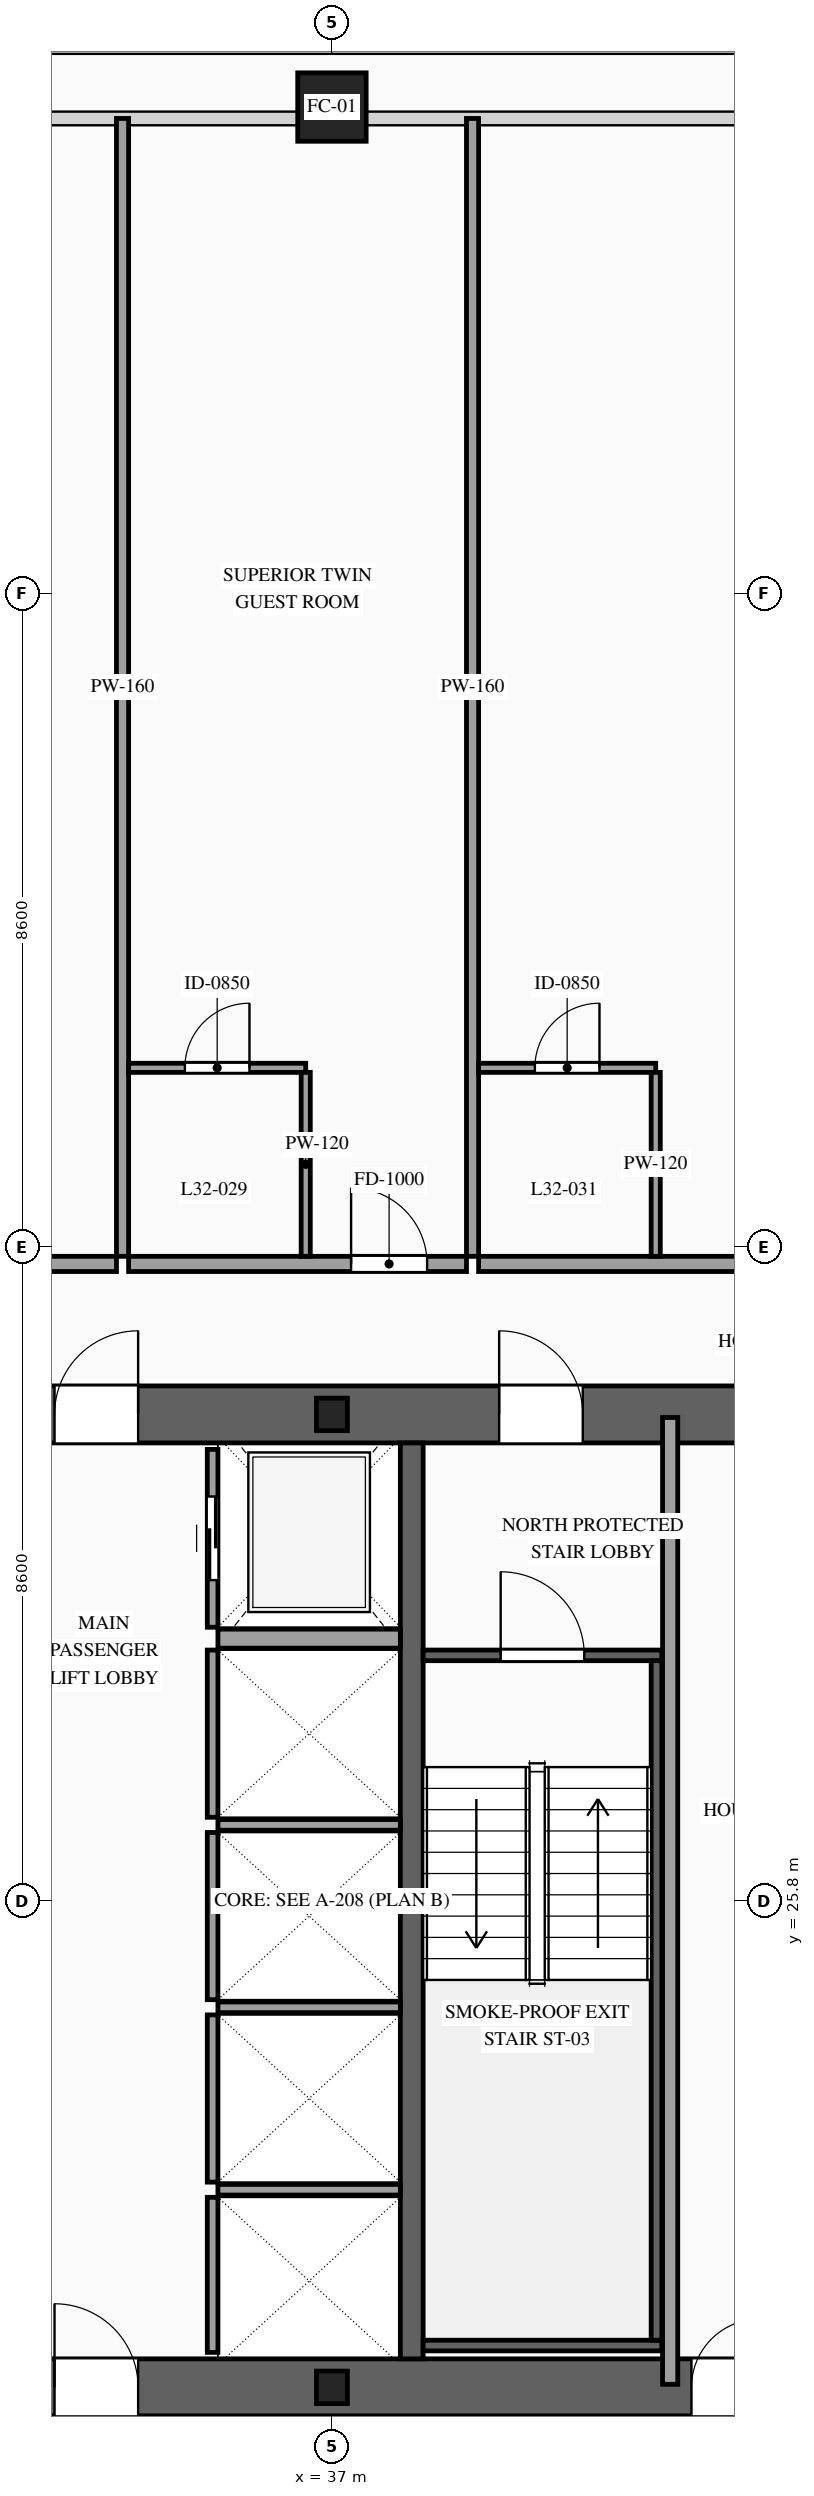
"""IFC4 building model, lengths in metres.
Left out: names, types, materials, properties, quantities, classifications, styles, units other than length and angle.
Written with IfcOpenShell. Run it as: python <this file> out.ifc"""

import sys

from ifc_helpers import new_model, si_unit, direction, frame, frame_2d, origin, origin_2d, place, context, subcontext, project, spatial, rectangle, hollow_rectangle, i_section, extrude, source, transform, mapped, element, fill, save


model = new_model("IFC4")
c1 = context("Model", 3, precision=1e-05, world=origin(), true_north=direction((0.0, 1.0)))
c2 = subcontext(c1, "Body", "Model", "MODEL_VIEW")
j1 = project(units=[si_unit("LENGTHUNIT", "METRE"), si_unit("PLANEANGLEUNIT", "RADIAN")], contexts=[c1])
p1 = place(None, origin())
s1 = spatial("IfcSite", under=j1, at=p1, CompositionType="ELEMENT")
p2 = place(p1, origin())
s2 = spatial("IfcBuilding", under=s1, at=p2, CompositionType="ELEMENT")
p3 = place(p2, frame((0.0, 0.0, 122.6)))
s3 = spatial("IfcBuildingStorey", under=s2, at=p3, CompositionType="ELEMENT", Elevation=122.6)
p4 = place(p3, frame((23.425, 19.4, 0.0), z_axis=(0.0, 0.0, 1.0), x_axis=(1.0, 0.0, 0.0)))
e1 = element("IfcWall", 1, at=p4, inside=s3, PredefinedType="SHEAR", context=c2, shape_type="SweptSolid", body=[
    extrude(rectangle(XDim=27.15, YDim=0.75, at=frame_2d((13.575, 0.0))), origin(), (0.0, 0.0, 1.0), 3.6),
])
p5 = place(p4, frame((2.025, 0.0, 0.0)))
e2 = element("IfcOpeningElement", 2, at=p5, cuts=e1, PredefinedType="OPENING", context=c2, shape_type="SweptSolid", body=[
    extrude(rectangle(XDim=1.1, YDim=2.2, at=frame_2d((0.55, 1.1))), frame((0.0, 0.39, 0.0), z_axis=(0.0, -1.0, 0.0), x_axis=(1.0, 0.0, 0.0)), (0.0, 0.0, 1.0), 0.78),
])
p6 = place(p4, frame((9.925, 0.0, 0.0)))
e3 = element("IfcOpeningElement", 3, at=p6, cuts=e1, PredefinedType="OPENING", context=c2, shape_type="SweptSolid", body=[
    extrude(rectangle(XDim=1.1, YDim=2.2, at=frame_2d((0.55, 1.1))), frame((0.0, 0.39, 0.0), z_axis=(0.0, -1.0, 0.0), x_axis=(1.0, 0.0, 0.0)), (0.0, 0.0, 1.0), 0.78),
])
p7 = place(p4, frame((23.125, 0.0, 0.0)))
e4 = element("IfcOpeningElement", 4, at=p7, cuts=e1, PredefinedType="OPENING", context=c2, shape_type="SweptSolid", body=[
    extrude(rectangle(XDim=1.1, YDim=2.2, at=frame_2d((0.55, 1.1))), frame((0.0, 0.39, 0.0), z_axis=(0.0, -1.0, 0.0), x_axis=(1.0, 0.0, 0.0)), (0.0, 0.0, 1.0), 0.78),
])
p8 = place(p4, frame((19.745, 0.0, 0.0)))
e5 = element("IfcOpeningElement", 5, at=p8, cuts=e1, PredefinedType="OPENING", context=c2, shape_type="SweptSolid", body=[
    extrude(rectangle(XDim=0.9, YDim=2.15, at=frame_2d((0.45, 1.075))), frame((0.0, 0.39, 0.0), z_axis=(0.0, -1.0, 0.0), x_axis=(1.0, 0.0, 0.0)), (0.0, 0.0, 1.0), 0.78),
])
p9 = place(p4, frame((18.305, 0.0, 0.0)))
e6 = element("IfcOpeningElement", 6, at=p9, cuts=e1, PredefinedType="OPENING", context=c2, shape_type="SweptSolid", body=[
    extrude(rectangle(XDim=0.9, YDim=2.15, at=frame_2d((0.45, 1.075))), frame((0.0, 0.39, 0.0), z_axis=(0.0, -1.0, 0.0), x_axis=(1.0, 0.0, 0.0)), (0.0, 0.0, 1.0), 0.78),
])
p10 = place(p3, frame((23.425, 32.2, 0.0), z_axis=(0.0, 0.0, 1.0), x_axis=(1.0, 0.0, 0.0)))
e7 = element("IfcWall", 7, at=p10, inside=s3, PredefinedType="SHEAR", context=c2, shape_type="SweptSolid", body=[
    extrude(rectangle(XDim=27.15, YDim=0.75, at=frame_2d((13.575, 0.0))), origin(), (0.0, 0.0, 1.0), 3.6),
])
p11 = place(p10, frame((4.645, 0.0, 0.0)))
e8 = element("IfcOpeningElement", 8, at=p11, cuts=e7, PredefinedType="OPENING", context=c2, shape_type="SweptSolid", body=[
    extrude(rectangle(XDim=0.9, YDim=2.15, at=frame_2d((0.45, 1.075))), frame((0.0, 0.39, 0.0), z_axis=(0.0, -1.0, 0.0), x_axis=(1.0, 0.0, 0.0)), (0.0, 0.0, 1.0), 0.78),
])
p12 = place(p10, frame((9.925, 0.0, 0.0)))
e9 = element("IfcOpeningElement", 9, at=p12, cuts=e7, PredefinedType="OPENING", context=c2, shape_type="SweptSolid", body=[
    extrude(rectangle(XDim=1.1, YDim=2.2, at=frame_2d((0.55, 1.1))), frame((0.0, 0.39, 0.0), z_axis=(0.0, -1.0, 0.0), x_axis=(1.0, 0.0, 0.0)), (0.0, 0.0, 1.0), 0.78),
])
p13 = place(p10, frame((15.775, 0.0, 0.0)))
e10 = element("IfcOpeningElement", 10, at=p13, cuts=e7, PredefinedType="OPENING", context=c2, shape_type="SweptSolid", body=[
    extrude(rectangle(XDim=1.1, YDim=2.2, at=frame_2d((0.55, 1.1))), frame((0.0, 0.39, 0.0), z_axis=(0.0, -1.0, 0.0), x_axis=(1.0, 0.0, 0.0)), (0.0, 0.0, 1.0), 0.78),
])
m1 = source(origin(), c2, "Body", "SweptSolid", [
    extrude(rectangle(XDim=12.05, YDim=0.3, at=frame_2d((6.025, 0.0))), origin(), (0.0, 0.0, 1.0), 3.6),
])
p14 = place(p3, frame((38.05, 19.775, 0.0), z_axis=(0.0, 0.0, 1.0), x_axis=(0.0, 1.0, 0.0)))
e11 = element("IfcWall", 11, at=p14, inside=s3, PredefinedType="SOLIDWALL", context=c2, shape_type="MappedRepresentation", body=[
    mapped(m1, transform((0.0, 0.0, 0.0), scale=1.0)),
])
m2 = source(origin(), c2, "Body", "SweptSolid", [
    extrude(i_section(OverallWidth=0.407, OverallDepth=0.428, WebThickness=0.02, FlangeThickness=0.035, at=origin_2d()), origin(), (0.0, 0.0, 1.0), 3.6),
])
for number, where, z_axis, x_axis in (
    (12, (37.0, 19.4, 0.0), (0.0, 0.0, 1.0), (1.0, 0.0, 0.0)),
    (13, (37.0, 32.2, 0.0), (0.0, 0.0, 1.0), (1.0, 0.0, 0.0)),
):
    element("IfcColumn", number, at=place(p3, frame(where, z_axis=z_axis, x_axis=x_axis)), inside=s3, PredefinedType="COLUMN", context=c2, shape_type="MappedRepresentation", body=[
        mapped(m2, transform((0.0, 0.0, 0.0), scale=1.0)),
    ])
m3 = source(origin(), c2, "Body", "SweptSolid", [
    extrude(hollow_rectangle(XDim=0.9, YDim=0.9, WallThickness=0.042, at=origin_2d()), origin(), (0.0, 0.0, 1.0), 3.6),
])
p15 = place(p3, frame((37.0, 49.4, 0.0), z_axis=(0.0, 0.0, 1.0), x_axis=(1.0, 0.0, 0.0)))
e14 = element("IfcColumn", 14, at=p15, inside=s3, PredefinedType="COLUMN", context=c2, shape_type="MappedRepresentation", body=[
    mapped(m3, transform((0.0, 0.0, 0.0), scale=1.0)),
])
m4 = source(origin(), c2, "Body", "SweptSolid", [
    extrude(rectangle(XDim=2.04, YDim=0.14, at=frame_2d((1.02, 0.0))), origin(), (0.0, 0.0, 1.0), 3.38),
])
p16 = place(p3, frame((35.43, 19.86, 0.0), z_axis=(0.0, 0.0, 1.0), x_axis=(0.0, 1.0, 0.0)))
e15 = element("IfcWall", 15, at=p16, inside=s3, PredefinedType="SOLIDWALL", context=c2, shape_type="MappedRepresentation", body=[
    mapped(m4, transform((0.0, 0.0, 0.0), scale=1.0)),
])
m5 = source(origin(), c2, "Body", "SweptSolid", [
    extrude(rectangle(XDim=2.4, YDim=0.14, at=frame_2d((1.2, 0.0))), origin(), (0.0, 0.0, 1.0), 3.38),
])
p17 = place(p3, frame((35.5, 22.0, 0.0), z_axis=(0.0, 0.0, 1.0), x_axis=(1.0, 0.0, 0.0)))
e16 = element("IfcWall", 16, at=p17, inside=s3, PredefinedType="SOLIDWALL", context=c2, shape_type="MappedRepresentation", body=[
    mapped(m5, transform((0.0, 0.0, 0.0), scale=1.0)),
])
m6 = source(origin(), c2, "Body", "SweptSolid", [
    extrude(rectangle(XDim=2.2, YDim=0.14, at=frame_2d((1.1, 0.0))), origin(), (0.0, 0.0, 1.0), 3.38),
])
p18 = place(p3, frame((35.43, 22.1, 0.0), z_axis=(0.0, 0.0, 1.0), x_axis=(0.0, 1.0, 0.0)))
e17 = element("IfcWall", 17, at=p18, inside=s3, PredefinedType="SOLIDWALL", context=c2, shape_type="MappedRepresentation", body=[
    mapped(m6, transform((0.0, 0.0, 0.0), scale=1.0)),
])
p19 = place(p3, frame((35.5, 24.4, 0.0), z_axis=(0.0, 0.0, 1.0), x_axis=(1.0, 0.0, 0.0)))
e18 = element("IfcWall", 18, at=p19, inside=s3, PredefinedType="SOLIDWALL", context=c2, shape_type="MappedRepresentation", body=[
    mapped(m5, transform((0.0, 0.0, 0.0), scale=1.0)),
])
p20 = place(p3, frame((35.43, 24.5, 0.0), z_axis=(0.0, 0.0, 1.0), x_axis=(0.0, 1.0, 0.0)))
e19 = element("IfcWall", 19, at=p20, inside=s3, PredefinedType="SOLIDWALL", context=c2, shape_type="MappedRepresentation", body=[
    mapped(m6, transform((0.0, 0.0, 0.0), scale=1.0)),
])
p21 = place(p3, frame((35.5, 26.8, 0.0), z_axis=(0.0, 0.0, 1.0), x_axis=(1.0, 0.0, 0.0)))
e20 = element("IfcWall", 20, at=p21, inside=s3, PredefinedType="SOLIDWALL", context=c2, shape_type="MappedRepresentation", body=[
    mapped(m5, transform((0.0, 0.0, 0.0), scale=1.0)),
])
m7 = source(origin(), c2, "Body", "SweptSolid", [
    extrude(rectangle(XDim=2.2, YDim=0.14, at=frame_2d((1.1, 0.0))), origin(), (0.0, 0.0, 1.0), 3.38),
])
p22 = place(p3, frame((35.43, 26.9, 0.0), z_axis=(0.0, 0.0, 1.0), x_axis=(0.0, 1.0, 0.0)))
e21 = element("IfcWall", 21, at=p22, inside=s3, PredefinedType="SOLIDWALL", context=c2, shape_type="MappedRepresentation", body=[
    mapped(m7, transform((0.0, 0.0, 0.0), scale=1.0)),
])
p23 = place(p3, frame((35.43, 29.4, 0.0), z_axis=(0.0, 0.0, 1.0), x_axis=(0.0, 1.0, 0.0)))
e22 = element("IfcWall", 22, at=p23, inside=s3, PredefinedType="SOLIDWALL", context=c2, shape_type="SweptSolid", body=[
    extrude(rectangle(XDim=2.34, YDim=0.14, at=frame_2d((1.17, 0.0))), origin(), (0.0, 0.0, 1.0), 3.38),
])
p24 = place(p23, frame((0.62, 0.0, 0.0)))
e23 = element("IfcOpeningElement", 23, at=p24, cuts=e22, PredefinedType="OPENING", context=c2, shape_type="SweptSolid", body=[
    extrude(rectangle(XDim=1.1, YDim=2.2, at=frame_2d((0.55, 1.1))), frame((0.0, 0.085, 0.0), z_axis=(0.0, -1.0, 0.0), x_axis=(1.0, 0.0, 0.0)), (0.0, 0.0, 1.0), 0.17),
])
m8 = source(origin(), c2, "Body", "SweptSolid", [
    extrude(rectangle(XDim=2.4, YDim=0.25, at=frame_2d((1.2, 0.0))), origin(), (0.0, 0.0, 1.0), 3.38),
])
p25 = place(p3, frame((35.5, 29.25, 0.0), z_axis=(0.0, 0.0, 1.0), x_axis=(1.0, 0.0, 0.0)))
e24 = element("IfcWall", 24, at=p25, inside=s3, PredefinedType="SOLIDWALL", context=c2, shape_type="MappedRepresentation", body=[
    mapped(m8, transform((0.0, 0.0, 0.0), scale=1.0)),
])
p26 = place(p3, frame((38.2, 29.03, 0.0), z_axis=(0.0, 0.0, 1.0), x_axis=(1.0, 0.0, 0.0)))
e25 = element("IfcWall", 25, at=p26, inside=s3, PredefinedType="SOLIDWALL", context=c2, shape_type="SweptSolid", body=[
    extrude(rectangle(XDim=3.14, YDim=0.14, at=frame_2d((1.57, 0.0))), origin(), (0.0, 0.0, 1.0), 3.38),
])
p27 = place(p26, frame((1.02, 0.0, 0.0)))
e26 = element("IfcOpeningElement", 26, at=p27, cuts=e25, PredefinedType="OPENING", context=c2, shape_type="SweptSolid", body=[
    extrude(rectangle(XDim=1.1, YDim=2.2, at=frame_2d((0.55, 1.1))), frame((0.0, 0.085, 0.0), z_axis=(0.0, -1.0, 0.0), x_axis=(1.0, 0.0, 0.0)), (0.0, 0.0, 1.0), 0.17),
])
m9 = source(origin(), c2, "Body", "SweptSolid", [
    extrude(rectangle(XDim=3.14, YDim=0.14, at=frame_2d((1.57, 0.0))), origin(), (0.0, 0.0, 1.0), 3.38),
])
p28 = place(p3, frame((38.2, 19.95, 0.0), z_axis=(0.0, 0.0, 1.0), x_axis=(1.0, 0.0, 0.0)))
e27 = element("IfcWall", 27, at=p28, inside=s3, PredefinedType="SOLIDWALL", context=c2, shape_type="MappedRepresentation", body=[
    mapped(m9, transform((0.0, 0.0, 0.0), scale=1.0)),
])
m10 = source(origin(), c2, "Body", "SweptSolid", [
    extrude(rectangle(XDim=8.94, YDim=0.14, at=frame_2d((4.47, 0.0))), origin(), (0.0, 0.0, 1.0), 3.38),
])
p29 = place(p3, frame((41.27, 20.02, 0.0), z_axis=(0.0, 0.0, 1.0), x_axis=(0.0, 1.0, 0.0)))
e28 = element("IfcWall", 28, at=p29, inside=s3, PredefinedType="SOLIDWALL", context=c2, shape_type="MappedRepresentation", body=[
    mapped(m10, transform((0.0, 0.0, 0.0), scale=1.0)),
])
m11 = source(origin(), c2, "Body", "SweptSolid", [
    extrude(rectangle(XDim=12.72, YDim=0.2, at=frame_2d((6.36, 0.0))), origin(), (0.0, 0.0, 1.0), 3.38),
])
p30 = place(p3, frame((41.45, 19.44, 0.0), z_axis=(0.0, 0.0, 1.0), x_axis=(0.0, 1.0, 0.0)))
e29 = element("IfcWall", 29, at=p30, inside=s3, PredefinedType="PARTITIONING", context=c2, shape_type="MappedRepresentation", body=[
    mapped(m11, transform((0.0, 0.0, 0.0), scale=1.0)),
])
p31 = place(p3, frame((22.482, 34.18, 0.0), z_axis=(0.0, 0.0, 1.0), x_axis=(1.0, 0.0, 0.0)))
e30 = element("IfcWall", 30, at=p31, inside=s3, PredefinedType="PARTITIONING", context=c2, shape_type="SweptSolid", body=[
    extrude(rectangle(XDim=11.683, YDim=0.2, at=frame_2d((5.842, 0.0))), origin(), (0.0, 0.0, 1.0), 3.38),
])
p32 = place(p31, frame((6.547, 0.0, 0.0)))
e31 = element("IfcOpeningElement", 31, at=p32, cuts=e30, PredefinedType="OPENING", context=c2, shape_type="SweptSolid", body=[
    extrude(rectangle(XDim=1.0, YDim=2.2, at=frame_2d((0.5, 1.1))), frame((0.0, 0.115, 0.0), z_axis=(0.0, -1.0, 0.0), x_axis=(1.0, 0.0, 0.0)), (0.0, 0.0, 1.0), 0.23),
])
m12 = source(origin(), c2, "Body", "SweptSolid", [
    extrude(rectangle(XDim=14.97, YDim=0.16, at=frame_2d((7.485, 0.0))), origin(), (0.0, 0.0, 1.0), 3.38),
])
p33 = place(p3, frame((34.245, 34.28, 0.0), z_axis=(0.0, 0.0, 1.0), x_axis=(0.0, 1.0, 0.0)))
e32 = element("IfcWall", 32, at=p33, inside=s3, PredefinedType="PARTITIONING", context=c2, shape_type="MappedRepresentation", body=[
    mapped(m12, transform((0.0, 0.0, 0.0), scale=1.0)),
])
p34 = place(p3, frame((34.325, 34.18, 0.0), z_axis=(0.0, 0.0, 1.0), x_axis=(1.0, 0.0, 0.0)))
e33 = element("IfcWall", 33, at=p34, inside=s3, PredefinedType="PARTITIONING", context=c2, shape_type="SweptSolid", body=[
    extrude(rectangle(XDim=4.445, YDim=0.2, at=frame_2d((2.223, 0.0))), origin(), (0.0, 0.0, 1.0), 3.38),
])
p35 = place(p34, frame((2.927, 0.0, 0.0)))
e34 = element("IfcOpeningElement", 34, at=p35, cuts=e33, PredefinedType="OPENING", context=c2, shape_type="SweptSolid", body=[
    extrude(rectangle(XDim=1.0, YDim=2.2, at=frame_2d((0.5, 1.1))), frame((0.0, 0.115, 0.0), z_axis=(0.0, -1.0, 0.0), x_axis=(1.0, 0.0, 0.0)), (0.0, 0.0, 1.0), 0.23),
])
p36 = place(p3, frame((38.85, 34.28, 0.0), z_axis=(0.0, 0.0, 1.0), x_axis=(0.0, 1.0, 0.0)))
e35 = element("IfcWall", 35, at=p36, inside=s3, PredefinedType="PARTITIONING", context=c2, shape_type="MappedRepresentation", body=[
    mapped(m12, transform((0.0, 0.0, 0.0), scale=1.0)),
])
p37 = place(p3, frame((34.325, 36.76, 0.0), z_axis=(0.0, 0.0, 1.0), x_axis=(1.0, 0.0, 0.0)))
e36 = element("IfcWall", 36, at=p37, inside=s3, PredefinedType="PARTITIONING", context=c2, shape_type="SweptSolid", body=[
    extrude(rectangle(XDim=2.33, YDim=0.12, at=frame_2d((1.165, 0.0))), origin(), (0.0, 0.0, 1.0), 3.38),
])
p38 = place(p37, frame((0.74, 0.0, 0.0)))
e37 = element("IfcOpeningElement", 37, at=p38, cuts=e36, PredefinedType="OPENING", context=c2, shape_type="SweptSolid", body=[
    extrude(rectangle(XDim=0.85, YDim=2.1, at=frame_2d((0.425, 1.05))), frame((0.0, 0.075, 0.0), z_axis=(0.0, -1.0, 0.0), x_axis=(1.0, 0.0, 0.0)), (0.0, 0.0, 1.0), 0.15),
])
m13 = source(origin(), c2, "Body", "SweptSolid", [
    extrude(rectangle(XDim=2.42, YDim=0.12, at=frame_2d((1.21, 0.0))), origin(), (0.0, 0.0, 1.0), 3.38),
])
p39 = place(p3, frame((36.655, 34.28, 0.0), z_axis=(0.0, 0.0, 1.0), x_axis=(0.0, 1.0, 0.0)))
e38 = element("IfcWall", 38, at=p39, inside=s3, PredefinedType="PARTITIONING", context=c2, shape_type="MappedRepresentation", body=[
    mapped(m13, transform((0.0, 0.0, 0.0), scale=1.0)),
])
p40 = place(p3, frame((38.93, 34.18, 0.0), z_axis=(0.0, 0.0, 1.0), x_axis=(1.0, 0.0, 0.0)))
e39 = element("IfcWall", 39, at=p40, inside=s3, PredefinedType="PARTITIONING", context=c2, shape_type="SweptSolid", body=[
    extrude(rectangle(XDim=11.683, YDim=0.2, at=frame_2d((5.842, 0.0))), origin(), (0.0, 0.0, 1.0), 3.38),
])
p41 = place(p40, frame((6.547, 0.0, 0.0)))
e40 = element("IfcOpeningElement", 40, at=p41, cuts=e39, PredefinedType="OPENING", context=c2, shape_type="SweptSolid", body=[
    extrude(rectangle(XDim=1.0, YDim=2.2, at=frame_2d((0.5, 1.1))), frame((0.0, 0.115, 0.0), z_axis=(0.0, -1.0, 0.0), x_axis=(1.0, 0.0, 0.0)), (0.0, 0.0, 1.0), 0.23),
])
p42 = place(p3, frame((38.93, 36.76, 0.0), z_axis=(0.0, 0.0, 1.0), x_axis=(1.0, 0.0, 0.0)))
e41 = element("IfcWall", 41, at=p42, inside=s3, PredefinedType="PARTITIONING", context=c2, shape_type="SweptSolid", body=[
    extrude(rectangle(XDim=2.33, YDim=0.12, at=frame_2d((1.165, 0.0))), origin(), (0.0, 0.0, 1.0), 3.38),
])
p43 = place(p42, frame((0.74, 0.0, 0.0)))
e42 = element("IfcOpeningElement", 42, at=p43, cuts=e41, PredefinedType="OPENING", context=c2, shape_type="SweptSolid", body=[
    extrude(rectangle(XDim=0.85, YDim=2.1, at=frame_2d((0.425, 1.05))), frame((0.0, 0.075, 0.0), z_axis=(0.0, -1.0, 0.0), x_axis=(1.0, 0.0, 0.0)), (0.0, 0.0, 1.0), 0.15),
])
p44 = place(p3, frame((41.26, 34.28, 0.0), z_axis=(0.0, 0.0, 1.0), x_axis=(0.0, 1.0, 0.0)))
e43 = element("IfcWall", 43, at=p44, inside=s3, PredefinedType="PARTITIONING", context=c2, shape_type="MappedRepresentation", body=[
    mapped(m13, transform((0.0, 0.0, 0.0), scale=1.0)),
])
m14 = source(origin(), c2, "Body", "SweptSolid", [
    extrude(rectangle(XDim=1.1, YDim=2.2, at=frame_2d((0.55, 1.1))), frame((0.0, 0.025, 0.0), z_axis=(0.0, -1.0, 0.0), x_axis=(1.0, 0.0, 0.0)), (0.0, 0.0, 1.0), 0.05),
])
p45 = place(p24, origin())
e44 = element("IfcDoor", 44, at=p45, inside=s3, OperationType="SLIDING_TO_RIGHT", PredefinedType="DOOR", context=c2, shape_type="MappedRepresentation", body=[
    mapped(m14, transform((0.0, 0.0, 0.0), scale=1.0)),
])
fill(e23, e44)
m15 = source(origin(), c2, "Body", "SweptSolid", [
    extrude(rectangle(XDim=1.1, YDim=2.2, at=frame_2d((0.55, 1.1))), frame((0.0, 0.025, 0.0), z_axis=(0.0, -1.0, 0.0), x_axis=(1.0, 0.0, 0.0)), (0.0, 0.0, 1.0), 0.05),
])
p46 = place(p27, origin())
e45 = element("IfcDoor", 45, at=p46, inside=s3, OperationType="SINGLE_SWING_LEFT", PredefinedType="DOOR", context=c2, shape_type="MappedRepresentation", body=[
    mapped(m15, transform((0.0, 0.0, 0.0), scale=1.0)),
])
fill(e26, e45)
p47 = place(p6, origin())
e46 = element("IfcDoor", 46, at=p47, inside=s3, OperationType="SINGLE_SWING_LEFT", PredefinedType="DOOR", context=c2, shape_type="MappedRepresentation", body=[
    mapped(m15, transform((0.0, 0.0, 0.0), scale=1.0)),
])
fill(e3, e46)
p48 = place(p12, origin())
e47 = element("IfcDoor", 47, at=p48, inside=s3, OperationType="SINGLE_SWING_RIGHT", PredefinedType="DOOR", context=c2, shape_type="MappedRepresentation", body=[
    mapped(m15, transform((0.0, 0.0, 0.0), scale=1.0)),
])
fill(e9, e47)
p49 = place(p13, origin())
e48 = element("IfcDoor", 48, at=p49, inside=s3, OperationType="SINGLE_SWING_LEFT", PredefinedType="DOOR", context=c2, shape_type="MappedRepresentation", body=[
    mapped(m15, transform((0.0, 0.0, 0.0), scale=1.0)),
])
fill(e10, e48)
m16 = source(origin(), c2, "Body", "SweptSolid", [
    extrude(rectangle(XDim=0.9, YDim=2.15, at=frame_2d((0.45, 1.075))), frame((0.0, 0.025, 0.0), z_axis=(0.0, -1.0, 0.0), x_axis=(1.0, 0.0, 0.0)), (0.0, 0.0, 1.0), 0.05),
])
p50 = place(p9, origin())
e49 = element("IfcDoor", 49, at=p50, inside=s3, OperationType="SINGLE_SWING_RIGHT", PredefinedType="DOOR", context=c2, shape_type="MappedRepresentation", body=[
    mapped(m16, transform((0.0, 0.0, 0.0), scale=1.0)),
])
fill(e6, e49)
m17 = source(origin(), c2, "Body", "SweptSolid", [
    extrude(rectangle(XDim=1.0, YDim=2.2, at=frame_2d((0.5, 1.1))), frame((0.0, 0.025, 0.0), z_axis=(0.0, -1.0, 0.0), x_axis=(1.0, 0.0, 0.0)), (0.0, 0.0, 1.0), 0.05),
])
p51 = place(p35, origin())
e50 = element("IfcDoor", 50, at=p51, inside=s3, OperationType="SINGLE_SWING_LEFT", PredefinedType="DOOR", context=c2, shape_type="MappedRepresentation", body=[
    mapped(m17, transform((0.0, 0.0, 0.0), scale=1.0)),
])
fill(e34, e50)
m18 = source(origin(), c2, "Body", "SweptSolid", [
    extrude(rectangle(XDim=0.85, YDim=2.1, at=frame_2d((0.425, 1.05))), frame((0.0, 0.025, 0.0), z_axis=(0.0, -1.0, 0.0), x_axis=(1.0, 0.0, 0.0)), (0.0, 0.0, 1.0), 0.05),
])
p52 = place(p38, origin())
e51 = element("IfcDoor", 51, at=p52, inside=s3, OperationType="SINGLE_SWING_RIGHT", PredefinedType="DOOR", context=c2, shape_type="MappedRepresentation", body=[
    mapped(m18, transform((0.0, 0.0, 0.0), scale=1.0)),
])
fill(e37, e51)
p53 = place(p43, origin())
e52 = element("IfcDoor", 52, at=p53, inside=s3, OperationType="SINGLE_SWING_RIGHT", PredefinedType="DOOR", context=c2, shape_type="MappedRepresentation", body=[
    mapped(m18, transform((0.0, 0.0, 0.0), scale=1.0)),
])
fill(e42, e52)
save(model, sys.argv[1])
